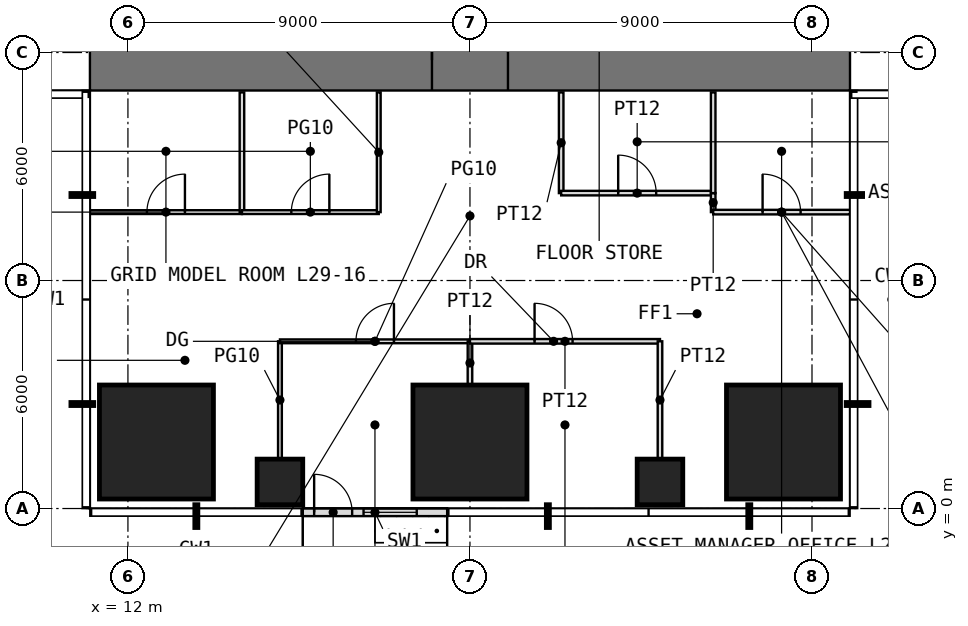
"""IFC4 building model, lengths in metres.
Left out: names, types, materials, properties, quantities, classifications, styles, units other than length and angle.
Written with IfcOpenShell. Run it as: python <this file> out.ifc"""

import sys

from ifc_helpers import new_model, si_unit, direction, frame, frame_2d, origin, origin_2d, place, context, subcontext, project, spatial, rectangle, extrude, element, fill, save


model = new_model("IFC4")
c1 = context("Model", 3, precision=1e-05, world=origin(), true_north=direction((0.0, 1.0)))
c2 = subcontext(c1, "Body", "Model", "MODEL_VIEW")
j1 = project(units=[si_unit("LENGTHUNIT", "METRE"), si_unit("PLANEANGLEUNIT", "RADIAN")], contexts=[c1])
p1 = place(None, origin())
s1 = spatial("IfcSite", under=j1, at=p1, CompositionType="ELEMENT")
p2 = place(p1, origin())
s2 = spatial("IfcBuilding", under=s1, at=p2, CompositionType="ELEMENT")
p3 = place(p2, frame((0.0, 0.0, 124.5)))
s3 = spatial("IfcBuildingStorey", under=s2, at=p3, CompositionType="ELEMENT", Elevation=124.5)
p4 = place(p3, frame((12.75, 1.75, 0.0), z_axis=(0.0, 0.0, 1.0), x_axis=(1.0, 0.0, 0.0)))
e1 = element("IfcColumn", 1, at=p4, inside=s3, PredefinedType="COLUMN", context=c2, shape_type="SweptSolid", body=[
    extrude(rectangle(XDim=3.0, YDim=3.0, at=origin_2d()), origin(), (0.0, 0.0, 1.0), 4.0),
])
p5 = place(p3, frame((16.0, 0.7, 0.0), z_axis=(0.0, 0.0, 1.0), x_axis=(1.0, 0.0, 0.0)))
e2 = element("IfcColumn", 2, at=p5, inside=s3, PredefinedType="COLUMN", context=c2, shape_type="SweptSolid", body=[
    extrude(rectangle(XDim=1.2, YDim=1.2, at=origin_2d()), origin(), (0.0, 0.0, 1.0), 4.0),
])
p6 = place(p3, frame((21.0, 1.75, 0.0), z_axis=(0.0, 0.0, 1.0), x_axis=(1.0, 0.0, 0.0)))
e3 = element("IfcColumn", 3, at=p6, inside=s3, PredefinedType="COLUMN", context=c2, shape_type="SweptSolid", body=[
    extrude(rectangle(XDim=3.0, YDim=3.0, at=origin_2d()), origin(), (0.0, 0.0, 1.0), 4.0),
])
p7 = place(p3, frame((26.0, 0.7, 0.0), z_axis=(0.0, 0.0, 1.0), x_axis=(1.0, 0.0, 0.0)))
e4 = element("IfcColumn", 4, at=p7, inside=s3, PredefinedType="COLUMN", context=c2, shape_type="SweptSolid", body=[
    extrude(rectangle(XDim=1.2, YDim=1.2, at=origin_2d()), origin(), (0.0, 0.0, 1.0), 4.0),
])
p8 = place(p3, frame((29.25, 1.75, 0.0), z_axis=(0.0, 0.0, 1.0), x_axis=(1.0, 0.0, 0.0)))
e5 = element("IfcColumn", 5, at=p8, inside=s3, PredefinedType="COLUMN", context=c2, shape_type="SweptSolid", body=[
    extrude(rectangle(XDim=3.0, YDim=3.0, at=origin_2d()), origin(), (0.0, 0.0, 1.0), 4.0),
])
p9 = place(p3, frame((16.6, -0.1, 0.0), z_axis=(0.0, 0.0, 1.0), x_axis=(1.0, 0.0, 0.0)))
e6 = element("IfcWall", 6, at=p9, inside=s3, PredefinedType="USERDEFINED", context=c2, shape_type="SweptSolid", body=[
    extrude(rectangle(XDim=3.8, YDim=0.2, at=frame_2d((1.9, 0.0))), origin(), (0.0, 0.0, 1.0), 3.75),
])
p10 = place(p9, frame((0.3, 0.0, 0.0)))
e7 = element("IfcOpeningElement", 7, at=p10, cuts=e6, PredefinedType="OPENING", context=c2, shape_type="SweptSolid", body=[
    extrude(rectangle(XDim=1.0, YDim=2.4, at=frame_2d((0.5, 1.2))), frame((0.0, 0.11, 0.0), z_axis=(0.0, -1.0, 0.0), x_axis=(1.0, 0.0, 0.0)), (0.0, 0.0, 1.0), 0.22),
])
p11 = place(p9, frame((1.6, 0.0, 0.3)))
e8 = element("IfcOpeningElement", 8, at=p11, cuts=e6, PredefinedType="OPENING", context=c2, shape_type="SweptSolid", body=[
    extrude(rectangle(XDim=1.4, YDim=2.7, at=frame_2d((0.7, 1.35))), frame((0.0, 0.11, 0.0), z_axis=(0.0, -1.0, 0.0), x_axis=(1.0, 0.0, 0.0)), (0.0, 0.0, 1.0), 0.22),
])
p12 = place(p3, frame((11.0, 11.8, -0.05), z_axis=(0.0, 0.0, 1.0), x_axis=(1.0, 0.0, 0.0)))
e9 = element("IfcWall", 9, at=p12, inside=s3, PredefinedType="SHEAR", context=c2, shape_type="SweptSolid", body=[
    extrude(rectangle(XDim=20.0, YDim=1.6, at=frame_2d((10.0, 0.0))), origin(), (0.0, 0.0, 1.0), 4.0),
])
p13 = place(p12, frame((9.0, 0.0, 0.05)))
e10 = element("IfcOpeningElement", 10, at=p13, cuts=e9, PredefinedType="OPENING", context=c2, shape_type="SweptSolid", body=[
    extrude(rectangle(XDim=2.0, YDim=2.2, at=frame_2d((1.0, 1.1))), frame((0.0, 0.81, 0.0), z_axis=(0.0, -1.0, 0.0), x_axis=(1.0, 0.0, 0.0)), (0.0, 0.0, 1.0), 1.62),
])
p14 = place(p3, frame((11.0, 7.8, 0.0), z_axis=(0.0, 0.0, 1.0), x_axis=(1.0, 0.0, 0.0)))
e11 = element("IfcWall", 11, at=p14, inside=s3, PredefinedType="PARTITIONING", context=c2, shape_type="SweptSolid", body=[
    extrude(rectangle(XDim=4.0, YDim=0.1, at=frame_2d((2.0, 0.0))), origin(), (0.0, 0.0, 1.0), 3.75),
])
p15 = place(p14, frame((1.5, 0.0, 0.0)))
e12 = element("IfcOpeningElement", 12, at=p15, cuts=e11, PredefinedType="OPENING", context=c2, shape_type="SweptSolid", body=[
    extrude(rectangle(XDim=1.0, YDim=2.4, at=frame_2d((0.5, 1.2))), frame((0.0, 0.06, 0.0), z_axis=(0.0, -1.0, 0.0), x_axis=(1.0, 0.0, 0.0)), (0.0, 0.0, 1.0), 0.12),
])
p16 = place(p3, frame((15.0, 7.8, 0.0), z_axis=(0.0, 0.0, 1.0), x_axis=(0.0, 1.0, 0.0)))
e13 = element("IfcWall", 13, at=p16, inside=s3, PredefinedType="PARTITIONING", context=c2, shape_type="SweptSolid", body=[
    extrude(rectangle(XDim=3.15, YDim=0.12, at=frame_2d((1.575, 0.0))), origin(), (0.0, 0.0, 1.0), 3.75),
])
p17 = place(p3, frame((15.0, 7.8, 0.0), z_axis=(0.0, 0.0, 1.0), x_axis=(1.0, 0.0, 0.0)))
e14 = element("IfcWall", 14, at=p17, inside=s3, PredefinedType="PARTITIONING", context=c2, shape_type="SweptSolid", body=[
    extrude(rectangle(XDim=3.6, YDim=0.1, at=frame_2d((1.8, 0.0))), origin(), (0.0, 0.0, 1.0), 3.75),
])
p18 = place(p17, frame((1.3, 0.0, 0.0)))
e15 = element("IfcOpeningElement", 15, at=p18, cuts=e14, PredefinedType="OPENING", context=c2, shape_type="SweptSolid", body=[
    extrude(rectangle(XDim=1.0, YDim=2.4, at=frame_2d((0.5, 1.2))), frame((0.0, 0.06, 0.0), z_axis=(0.0, -1.0, 0.0), x_axis=(1.0, 0.0, 0.0)), (0.0, 0.0, 1.0), 0.12),
])
p19 = place(p3, frame((16.0, 1.31, 0.0), z_axis=(0.0, 0.0, 1.0), x_axis=(0.0, 1.0, 0.0)))
e16 = element("IfcWall", 16, at=p19, inside=s3, PredefinedType="PARTITIONING", context=c2, shape_type="SweptSolid", body=[
    extrude(rectangle(XDim=3.09, YDim=0.1, at=frame_2d((1.545, 0.0))), origin(), (0.0, 0.0, 1.0), 3.75),
])
p20 = place(p3, frame((16.0, 4.4, 0.0), z_axis=(0.0, 0.0, 1.0), x_axis=(1.0, 0.0, 0.0)))
e17 = element("IfcWall", 17, at=p20, inside=s3, PredefinedType="PARTITIONING", context=c2, shape_type="SweptSolid", body=[
    extrude(rectangle(XDim=5.0, YDim=0.1, at=frame_2d((2.5, 0.0))), origin(), (0.0, 0.0, 1.0), 3.75),
])
p21 = place(p20, frame((2.0, 0.0, 0.0)))
e18 = element("IfcOpeningElement", 18, at=p21, cuts=e17, PredefinedType="OPENING", context=c2, shape_type="SweptSolid", body=[
    extrude(rectangle(XDim=1.0, YDim=2.4, at=frame_2d((0.5, 1.2))), frame((0.0, 0.06, 0.0), z_axis=(0.0, -1.0, 0.0), x_axis=(1.0, 0.0, 0.0)), (0.0, 0.0, 1.0), 0.12),
])
p22 = place(p3, frame((18.6, 7.8, 0.0), z_axis=(0.0, 0.0, 1.0), x_axis=(0.0, 1.0, 0.0)))
e19 = element("IfcWall", 19, at=p22, inside=s3, PredefinedType="PARTITIONING", context=c2, shape_type="SweptSolid", body=[
    extrude(rectangle(XDim=3.15, YDim=0.1, at=frame_2d((1.575, 0.0))), origin(), (0.0, 0.0, 1.0), 3.75),
])
p23 = place(p3, frame((21.0, 3.26, 0.0), z_axis=(0.0, 0.0, 1.0), x_axis=(0.0, 1.0, 0.0)))
e20 = element("IfcWall", 20, at=p23, inside=s3, PredefinedType="PARTITIONING", context=c2, shape_type="SweptSolid", body=[
    extrude(rectangle(XDim=1.14, YDim=0.12, at=frame_2d((0.57, 0.0))), origin(), (0.0, 0.0, 1.0), 3.75),
])
p24 = place(p3, frame((21.0, 4.4, 0.0), z_axis=(0.0, 0.0, 1.0), x_axis=(1.0, 0.0, 0.0)))
e21 = element("IfcWall", 21, at=p24, inside=s3, PredefinedType="PARTITIONING", context=c2, shape_type="SweptSolid", body=[
    extrude(rectangle(XDim=5.0, YDim=0.12, at=frame_2d((2.5, 0.0))), origin(), (0.0, 0.0, 1.0), 3.75),
])
p25 = place(p24, frame((1.7, 0.0, 0.0)))
e22 = element("IfcOpeningElement", 22, at=p25, cuts=e21, PredefinedType="OPENING", context=c2, shape_type="SweptSolid", body=[
    extrude(rectangle(XDim=1.0, YDim=2.2, at=frame_2d((0.5, 1.1))), frame((0.0, 0.07, 0.0), z_axis=(0.0, -1.0, 0.0), x_axis=(1.0, 0.0, 0.0)), (0.0, 0.0, 1.0), 0.14),
])
p26 = place(p3, frame((23.4, 8.3, 0.0), z_axis=(0.0, 0.0, 1.0), x_axis=(0.0, 1.0, 0.0)))
e23 = element("IfcWall", 23, at=p26, inside=s3, PredefinedType="PARTITIONING", context=c2, shape_type="SweptSolid", body=[
    extrude(rectangle(XDim=2.65, YDim=0.12, at=frame_2d((1.325, 0.0))), origin(), (0.0, 0.0, 1.0), 3.75),
])
p27 = place(p3, frame((23.4, 8.3, 0.0), z_axis=(0.0, 0.0, 1.0), x_axis=(1.0, 0.0, 0.0)))
e24 = element("IfcWall", 24, at=p27, inside=s3, PredefinedType="PARTITIONING", context=c2, shape_type="SweptSolid", body=[
    extrude(rectangle(XDim=4.0, YDim=0.12, at=frame_2d((2.0, 0.0))), origin(), (0.0, 0.0, 1.0), 3.75),
])
p28 = place(p27, frame((1.5, 0.0, 0.0)))
e25 = element("IfcOpeningElement", 25, at=p28, cuts=e24, PredefinedType="OPENING", context=c2, shape_type="SweptSolid", body=[
    extrude(rectangle(XDim=1.0, YDim=2.2, at=frame_2d((0.5, 1.1))), frame((0.0, 0.07, 0.0), z_axis=(0.0, -1.0, 0.0), x_axis=(1.0, 0.0, 0.0)), (0.0, 0.0, 1.0), 0.14),
])
p29 = place(p3, frame((26.0, 1.31, 0.0), z_axis=(0.0, 0.0, 1.0), x_axis=(0.0, 1.0, 0.0)))
e26 = element("IfcWall", 26, at=p29, inside=s3, PredefinedType="PARTITIONING", context=c2, shape_type="SweptSolid", body=[
    extrude(rectangle(XDim=3.09, YDim=0.12, at=frame_2d((1.545, 0.0))), origin(), (0.0, 0.0, 1.0), 3.75),
])
p30 = place(p3, frame((27.4, 7.8, 0.0), z_axis=(0.0, 0.0, 1.0), x_axis=(0.0, 1.0, 0.0)))
e27 = element("IfcWall", 27, at=p30, inside=s3, PredefinedType="PARTITIONING", context=c2, shape_type="SweptSolid", body=[
    extrude(rectangle(XDim=0.5, YDim=0.12, at=frame_2d((0.25, 0.0))), origin(), (0.0, 0.0, 1.0), 3.75),
])
p31 = place(p3, frame((27.4, 7.8, 0.0), z_axis=(0.0, 0.0, 1.0), x_axis=(1.0, 0.0, 0.0)))
e28 = element("IfcWall", 28, at=p31, inside=s3, PredefinedType="PARTITIONING", context=c2, shape_type="SweptSolid", body=[
    extrude(rectangle(XDim=3.6, YDim=0.12, at=frame_2d((1.8, 0.0))), origin(), (0.0, 0.0, 1.0), 3.75),
])
p32 = place(p31, frame((1.3, 0.0, 0.0)))
e29 = element("IfcOpeningElement", 29, at=p32, cuts=e28, PredefinedType="OPENING", context=c2, shape_type="SweptSolid", body=[
    extrude(rectangle(XDim=1.0, YDim=2.2, at=frame_2d((0.5, 1.1))), frame((0.0, 0.07, 0.0), z_axis=(0.0, -1.0, 0.0), x_axis=(1.0, 0.0, 0.0)), (0.0, 0.0, 1.0), 0.14),
])
p33 = place(p3, frame((27.4, 8.3, 0.0), z_axis=(0.0, 0.0, 1.0), x_axis=(0.0, 1.0, 0.0)))
e30 = element("IfcWall", 30, at=p33, inside=s3, PredefinedType="PARTITIONING", context=c2, shape_type="SweptSolid", body=[
    extrude(rectangle(XDim=2.65, YDim=0.12, at=frame_2d((1.325, 0.0))), origin(), (0.0, 0.0, 1.0), 3.75),
])
p34 = place(p10, origin())
e31 = element("IfcDoor", 31, at=p34, inside=s3, OperationType="SINGLE_SWING_LEFT", PredefinedType="DOOR", context=c2, shape_type="SweptSolid", body=[
    extrude(rectangle(XDim=1.0, YDim=2.4, at=frame_2d((0.5, 1.2))), frame((0.0, 0.025, 0.0), z_axis=(0.0, -1.0, 0.0), x_axis=(1.0, 0.0, 0.0)), (0.0, 0.0, 1.0), 0.05),
])
fill(e7, e31)
p35 = place(p11, origin())
e32 = element("IfcWindow", 32, at=p35, inside=s3, PartitioningType="SINGLE_PANEL", PredefinedType="WINDOW", context=c2, shape_type="SweptSolid", body=[
    extrude(rectangle(XDim=1.4, YDim=2.7, at=frame_2d((0.7, 1.35))), frame((0.0, 0.03, 0.0), z_axis=(0.0, -1.0, 0.0), x_axis=(1.0, 0.0, 0.0)), (0.0, 0.0, 1.0), 0.06),
])
fill(e8, e32)
p36 = place(p13, origin())
e33 = element("IfcDoor", 33, at=p36, inside=s3, OperationType="DOUBLE_DOOR_SINGLE_SWING", PredefinedType="DOOR", context=c2, shape_type="SweptSolid", body=[
    extrude(rectangle(XDim=2.0, YDim=2.2, at=frame_2d((1.0, 1.1))), frame((0.0, 0.025, 0.0), z_axis=(0.0, -1.0, 0.0), x_axis=(1.0, 0.0, 0.0)), (0.0, 0.0, 1.0), 0.05),
])
fill(e10, e33)
p37 = place(p15, origin())
e34 = element("IfcDoor", 34, at=p37, inside=s3, OperationType="SINGLE_SWING_RIGHT", PredefinedType="DOOR", context=c2, shape_type="SweptSolid", body=[
    extrude(rectangle(XDim=1.0, YDim=2.4, at=frame_2d((0.5, 1.2))), frame((0.0, 0.025, 0.0), z_axis=(0.0, -1.0, 0.0), x_axis=(1.0, 0.0, 0.0)), (0.0, 0.0, 1.0), 0.05),
])
fill(e12, e34)
p38 = place(p18, origin())
e35 = element("IfcDoor", 35, at=p38, inside=s3, OperationType="SINGLE_SWING_RIGHT", PredefinedType="DOOR", context=c2, shape_type="SweptSolid", body=[
    extrude(rectangle(XDim=1.0, YDim=2.4, at=frame_2d((0.5, 1.2))), frame((0.0, 0.025, 0.0), z_axis=(0.0, -1.0, 0.0), x_axis=(1.0, 0.0, 0.0)), (0.0, 0.0, 1.0), 0.05),
])
fill(e15, e35)
p39 = place(p28, origin())
e36 = element("IfcDoor", 36, at=p39, inside=s3, OperationType="SINGLE_SWING_LEFT", PredefinedType="DOOR", context=c2, shape_type="SweptSolid", body=[
    extrude(rectangle(XDim=1.0, YDim=2.2, at=frame_2d((0.5, 1.1))), frame((0.0, 0.025, 0.0), z_axis=(0.0, -1.0, 0.0), x_axis=(1.0, 0.0, 0.0)), (0.0, 0.0, 1.0), 0.05),
])
fill(e25, e36)
p40 = place(p32, origin())
e37 = element("IfcDoor", 37, at=p40, inside=s3, OperationType="SINGLE_SWING_LEFT", PredefinedType="DOOR", context=c2, shape_type="SweptSolid", body=[
    extrude(rectangle(XDim=1.0, YDim=2.2, at=frame_2d((0.5, 1.1))), frame((0.0, 0.025, 0.0), z_axis=(0.0, -1.0, 0.0), x_axis=(1.0, 0.0, 0.0)), (0.0, 0.0, 1.0), 0.05),
])
fill(e29, e37)
p41 = place(p21, origin())
e38 = element("IfcDoor", 38, at=p41, inside=s3, OperationType="SINGLE_SWING_RIGHT", PredefinedType="DOOR", context=c2, shape_type="SweptSolid", body=[
    extrude(rectangle(XDim=1.0, YDim=2.4, at=frame_2d((0.5, 1.2))), frame((0.0, 0.025, 0.0), z_axis=(0.0, -1.0, 0.0), x_axis=(1.0, 0.0, 0.0)), (0.0, 0.0, 1.0), 0.05),
])
fill(e18, e38)
p42 = place(p25, origin())
e39 = element("IfcDoor", 39, at=p42, inside=s3, OperationType="SINGLE_SWING_LEFT", PredefinedType="DOOR", context=c2, shape_type="SweptSolid", body=[
    extrude(rectangle(XDim=1.0, YDim=2.2, at=frame_2d((0.5, 1.1))), frame((0.0, 0.025, 0.0), z_axis=(0.0, -1.0, 0.0), x_axis=(1.0, 0.0, 0.0)), (0.0, 0.0, 1.0), 0.05),
])
fill(e22, e39)
save(model, sys.argv[1])
